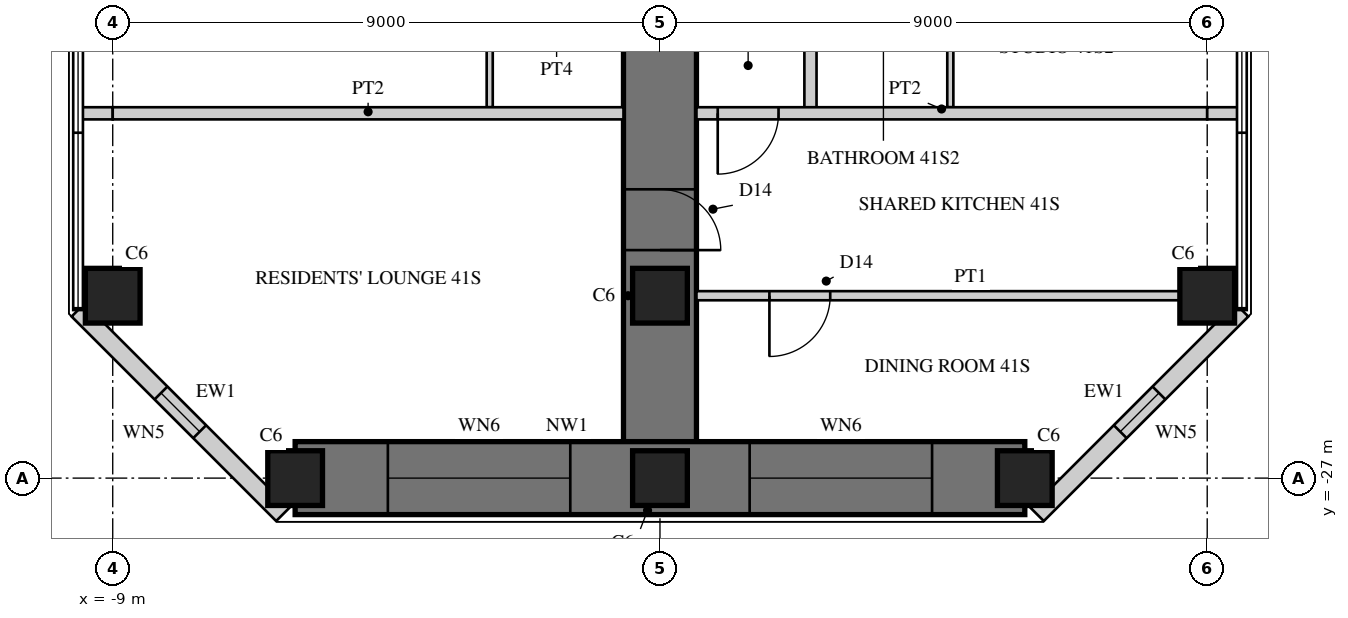
"""IFC4 building model, lengths in metres.
Left out: names, types, materials, properties, quantities, classifications, styles, units other than length and angle.
Written with IfcOpenShell. Run it as: python <this file> out.ifc"""

import sys

from ifc_helpers import new_model, si_unit, direction, frame, frame_2d, origin, origin_2d, place, context, subcontext, project, spatial, rectangle, hollow_rectangle, extrude, element, fill, save


model = new_model("IFC4")
c1 = context("Model", 3, precision=1e-05, world=origin(), true_north=direction((0.0, 1.0)))
c2 = subcontext(c1, "Body", "Model", "MODEL_VIEW")
j1 = project(units=[si_unit("LENGTHUNIT", "METRE"), si_unit("PLANEANGLEUNIT", "RADIAN")], contexts=[c1])
p1 = place(None, origin())
s1 = spatial("IfcSite", under=j1, at=p1, CompositionType="ELEMENT")
p2 = place(p1, origin())
s2 = spatial("IfcBuilding", under=s1, at=p2, CompositionType="ELEMENT")
p3 = place(p2, frame((0.0, 0.0, 169.5)))
s3 = spatial("IfcBuildingStorey", under=s2, at=p3, CompositionType="ELEMENT", Elevation=169.5)
p4 = place(p3, frame((0.0, -9.0, 0.0), z_axis=(0.0, 0.0, 1.0), x_axis=(0.0, -1.0, 0.0)))
e1 = element("IfcWall", 1, at=p4, inside=s3, PredefinedType="SHEAR", context=c2, shape_type="SweptSolid", body=[
    extrude(rectangle(XDim=18.0, YDim=1.2, at=frame_2d((9.0, 0.0))), origin(), (0.0, 0.0, 1.0), 3.4),
])
p5 = place(p4, frame((3.95, 0.0, 0.0)))
e2 = element("IfcOpeningElement", 2, at=p5, cuts=e1, PredefinedType="OPENING", context=c2, shape_type="SweptSolid", body=[
    extrude(rectangle(XDim=1.0, YDim=2.15, at=frame_2d((0.5, 1.075))), frame((0.0, 0.61, 0.0), z_axis=(0.0, -1.0, 0.0), x_axis=(1.0, 0.0, 0.0)), (0.0, 0.0, 1.0), 1.22),
])
p6 = place(p4, frame((6.6, 0.0, 0.0)))
e3 = element("IfcOpeningElement", 3, at=p6, cuts=e1, PredefinedType="OPENING", context=c2, shape_type="SweptSolid", body=[
    extrude(rectangle(XDim=1.0, YDim=2.15, at=frame_2d((0.5, 1.075))), frame((0.0, 0.61, 0.0), z_axis=(0.0, -1.0, 0.0), x_axis=(1.0, 0.0, 0.0)), (0.0, 0.0, 1.0), 1.22),
])
p7 = place(p4, frame((13.25, 0.0, 0.0)))
e4 = element("IfcOpeningElement", 4, at=p7, cuts=e1, PredefinedType="OPENING", context=c2, shape_type="SweptSolid", body=[
    extrude(rectangle(XDim=1.0, YDim=2.2, at=frame_2d((0.5, 1.1))), frame((0.0, 0.61, 0.0), z_axis=(0.0, -1.0, 0.0), x_axis=(1.0, 0.0, 0.0)), (0.0, 0.0, 1.0), 1.22),
])
p8 = place(p3, frame((-6.0, -27.0, 0.0), z_axis=(0.0, 0.0, 1.0), x_axis=(1.0, 0.0, 0.0)))
e5 = element("IfcWall", 5, at=p8, inside=s3, PredefinedType="SHEAR", context=c2, shape_type="SweptSolid", body=[
    extrude(rectangle(XDim=12.0, YDim=1.2, at=frame_2d((6.0, 0.0))), origin(), (0.0, 0.0, 1.0), 3.4),
])
p9 = place(p8, frame((1.525, 0.0, 0.6)))
e6 = element("IfcOpeningElement", 6, at=p9, cuts=e5, PredefinedType="OPENING", context=c2, shape_type="SweptSolid", body=[
    extrude(rectangle(XDim=3.0, YDim=2.4, at=frame_2d((1.5, 1.2))), frame((0.0, 0.61, 0.0), z_axis=(0.0, -1.0, 0.0), x_axis=(1.0, 0.0, 0.0)), (0.0, 0.0, 1.0), 1.22),
])
p10 = place(p8, frame((7.475, 0.0, 0.6)))
e7 = element("IfcOpeningElement", 7, at=p10, cuts=e5, PredefinedType="OPENING", context=c2, shape_type="SweptSolid", body=[
    extrude(rectangle(XDim=3.0, YDim=2.4, at=frame_2d((1.5, 1.2))), frame((0.0, 0.61, 0.0), z_axis=(0.0, -1.0, 0.0), x_axis=(1.0, 0.0, 0.0)), (0.0, 0.0, 1.0), 1.22),
])
for number, where, z_axis, x_axis in (
    (8, (-9.0, -24.0, 0.0), (0.0, 0.0, 1.0), (1.0, 0.0, 0.0)),
    (9, (9.0, -24.0, 0.0), (0.0, 0.0, 1.0), (1.0, 0.0, 0.0)),
    (10, (-6.0, -27.0, 0.0), (0.0, 0.0, 1.0), (1.0, 0.0, 0.0)),
    (11, (0.0, -27.0, 0.0), (0.0, 0.0, 1.0), (1.0, 0.0, 0.0)),
    (12, (6.0, -27.0, 0.0), (0.0, 0.0, 1.0), (1.0, 0.0, 0.0)),
    (13, (0.0, -24.0, 0.0), (0.0, 0.0, 1.0), (1.0, 0.0, 0.0)),
):
    element("IfcColumn", number, at=place(p3, frame(where, z_axis=z_axis, x_axis=x_axis)), inside=s3, PredefinedType="COLUMN", context=c2, shape_type="SweptSolid", body=[
        extrude(rectangle(XDim=0.9, YDim=0.9, at=origin_2d()), origin(), (0.0, 0.0, 1.0), 3.4),
    ])
p11 = place(p3, frame((-9.57, -24.236, 0.0), z_axis=(0.0, 0.0, 1.0), x_axis=(0.707106781187, -0.707106781187, 0.0)))
e14 = element("IfcWall", 14, at=p11, inside=s3, PredefinedType="SOLIDWALL", context=c2, shape_type="SweptSolid", body=[
    extrude(rectangle(XDim=4.757, YDim=0.3, at=frame_2d((2.379, 0.0))), origin(), (0.0, 0.0, 1.0), 3.22),
])
p12 = place(p11, frame((1.929, 0.0, 0.3)))
e15 = element("IfcOpeningElement", 15, at=p12, cuts=e14, PredefinedType="OPENING", context=c2, shape_type="SweptSolid", body=[
    extrude(rectangle(XDim=0.9, YDim=2.4, at=frame_2d((0.45, 1.2))), frame((0.0, 0.16, 0.0), z_axis=(0.0, -1.0, 0.0), x_axis=(1.0, 0.0, 0.0)), (0.0, 0.0, 1.0), 0.32),
])
p13 = place(p3, frame((6.206, -27.6, 0.0), z_axis=(0.0, 0.0, 1.0), x_axis=(0.707106781187, 0.707106781187, 0.0)))
e16 = element("IfcWall", 16, at=p13, inside=s3, PredefinedType="SOLIDWALL", context=c2, shape_type="SweptSolid", body=[
    extrude(rectangle(XDim=4.757, YDim=0.3, at=frame_2d((2.379, 0.0))), origin(), (0.0, 0.0, 1.0), 3.22),
])
p14 = place(p13, frame((1.929, 0.0, 0.3)))
e17 = element("IfcOpeningElement", 17, at=p14, cuts=e16, PredefinedType="OPENING", context=c2, shape_type="SweptSolid", body=[
    extrude(rectangle(XDim=0.9, YDim=2.4, at=frame_2d((0.45, 1.2))), frame((0.0, 0.16, 0.0), z_axis=(0.0, -1.0, 0.0), x_axis=(1.0, 0.0, 0.0)), (0.0, 0.0, 1.0), 0.32),
])
for number, where, z_axis, x_axis in (
    (18, (4.775, -18.45, 0.0), (0.0, 0.0, 1.0), (0.0, -1.0, 0.0)),
    (19, (-2.8, -18.45, 0.0), (0.0, 0.0, 1.0), (0.0, -1.0, 0.0)),
):
    element("IfcWall", number, at=place(p3, frame(where, z_axis=z_axis, x_axis=x_axis)), inside=s3, PredefinedType="PARTITIONING", context=c2, shape_type="SweptSolid", body=[
        extrude(rectangle(XDim=2.45, YDim=0.1, at=frame_2d((1.225, 0.0))), origin(), (0.0, 0.0, 1.0), 3.22),
    ])
p15 = place(p3, frame((2.475, -9.55, 0.0), z_axis=(0.0, 0.0, 1.0), x_axis=(0.0, -1.0, 0.0)))
e20 = element("IfcWall", 20, at=p15, inside=s3, PredefinedType="SOLIDWALL", context=c2, shape_type="SweptSolid", body=[
    extrude(rectangle(XDim=11.45, YDim=0.2, at=frame_2d((5.725, 0.0))), origin(), (0.0, 0.0, 1.0), 3.22),
])
p16 = place(p15, frame((3.6, 0.0, 0.0)))
e21 = element("IfcOpeningElement", 21, at=p16, cuts=e20, PredefinedType="OPENING", context=c2, shape_type="SweptSolid", body=[
    extrude(rectangle(XDim=1.0, YDim=2.15, at=frame_2d((0.5, 1.075))), frame((0.0, 0.11, 0.0), z_axis=(0.0, -1.0, 0.0), x_axis=(1.0, 0.0, 0.0)), (0.0, 0.0, 1.0), 0.22),
])
p17 = place(p15, frame((6.05, 0.0, 0.0)))
e22 = element("IfcOpeningElement", 22, at=p17, cuts=e20, PredefinedType="OPENING", context=c2, shape_type="SweptSolid", body=[
    extrude(rectangle(XDim=1.0, YDim=2.15, at=frame_2d((0.5, 1.075))), frame((0.0, 0.11, 0.0), z_axis=(0.0, -1.0, 0.0), x_axis=(1.0, 0.0, 0.0)), (0.0, 0.0, 1.0), 0.22),
])
p18 = place(p3, frame((0.6, -24.0, 0.0), z_axis=(0.0, 0.0, 1.0), x_axis=(1.0, 0.0, 0.0)))
e23 = element("IfcWall", 23, at=p18, inside=s3, PredefinedType="PARTITIONING", context=c2, shape_type="SweptSolid", body=[
    extrude(rectangle(XDim=7.95, YDim=0.15, at=frame_2d((3.975, 0.0))), origin(), (0.0, 0.0, 1.0), 2.47),
])
p19 = place(p18, frame((1.2, 0.0, 0.0)))
e24 = element("IfcOpeningElement", 24, at=p19, cuts=e23, PredefinedType="OPENING", context=c2, shape_type="SweptSolid", body=[
    extrude(rectangle(XDim=1.0, YDim=2.2, at=frame_2d((0.5, 1.1))), frame((0.0, 0.085, 0.0), z_axis=(0.0, -1.0, 0.0), x_axis=(1.0, 0.0, 0.0)), (0.0, 0.0, 1.0), 0.17),
])
p20 = place(p3, frame((-9.53, -21.0, 0.0), z_axis=(0.0, 0.0, 1.0), x_axis=(1.0, 0.0, 0.0)))
e25 = element("IfcWall", 25, at=p20, inside=s3, PredefinedType="SOLIDWALL", context=c2, shape_type="SweptSolid", body=[
    extrude(rectangle(XDim=0.53, YDim=0.2, at=frame_2d((0.265, 0.0))), origin(), (0.0, 0.0, 1.0), 3.22),
])
p21 = place(p3, frame((-9.0, -21.0, 0.0), z_axis=(0.0, 0.0, 1.0), x_axis=(1.0, 0.0, 0.0)))
e26 = element("IfcWall", 26, at=p21, inside=s3, PredefinedType="SOLIDWALL", context=c2, shape_type="SweptSolid", body=[
    extrude(rectangle(XDim=8.4, YDim=0.2, at=frame_2d((4.2, 0.0))), origin(), (0.0, 0.0, 1.0), 2.62),
])
p22 = place(p3, frame((0.6, -21.0, 0.0), z_axis=(0.0, 0.0, 1.0), x_axis=(1.0, 0.0, 0.0)))
e27 = element("IfcWall", 27, at=p22, inside=s3, PredefinedType="SOLIDWALL", context=c2, shape_type="SweptSolid", body=[
    extrude(rectangle(XDim=8.4, YDim=0.2, at=frame_2d((4.2, 0.0))), origin(), (0.0, 0.0, 1.0), 2.62),
])
p23 = place(p22, frame((0.35, 0.0, 0.0)))
e28 = element("IfcOpeningElement", 28, at=p23, cuts=e27, PredefinedType="OPENING", context=c2, shape_type="SweptSolid", body=[
    extrude(rectangle(XDim=1.0, YDim=2.2, at=frame_2d((0.5, 1.1))), frame((0.0, 0.11, 0.0), z_axis=(0.0, -1.0, 0.0), x_axis=(1.0, 0.0, 0.0)), (0.0, 0.0, 1.0), 0.22),
])
p24 = place(p3, frame((9.0, -21.0, 0.0), z_axis=(0.0, 0.0, 1.0), x_axis=(1.0, 0.0, 0.0)))
e29 = element("IfcWall", 29, at=p24, inside=s3, PredefinedType="SOLIDWALL", context=c2, shape_type="SweptSolid", body=[
    extrude(rectangle(XDim=0.53, YDim=0.2, at=frame_2d((0.265, 0.0))), origin(), (0.0, 0.0, 1.0), 3.22),
])
p25 = place(p12, origin())
e30 = element("IfcWindow", 30, at=p25, inside=s3, PartitioningType="SINGLE_PANEL", PredefinedType="WINDOW", context=c2, shape_type="SweptSolid", body=[
    extrude(hollow_rectangle(XDim=0.9, YDim=2.4, WallThickness=0.06, at=frame_2d((0.45, 1.2))), frame((0.0, 0.03, 0.0), z_axis=(0.0, -1.0, 0.0), x_axis=(1.0, 0.0, 0.0)), (0.0, 0.0, 1.0), 0.06),
    extrude(rectangle(XDim=0.779, YDim=2.279, at=frame_2d((0.45, 1.2))), frame((0.0, 0.03, 0.0), z_axis=(0.0, -1.0, 0.0), x_axis=(1.0, 0.0, 0.0)), (0.0, 0.0, 1.0), 0.06),
])
fill(e15, e30)
p26 = place(p9, origin())
e31 = element("IfcWindow", 31, at=p26, inside=s3, PartitioningType="SINGLE_PANEL", PredefinedType="WINDOW", context=c2, shape_type="SweptSolid", body=[
    extrude(hollow_rectangle(XDim=3.0, YDim=2.4, WallThickness=0.06, at=frame_2d((1.5, 1.2))), frame((0.0, 0.03, 0.0), z_axis=(0.0, -1.0, 0.0), x_axis=(1.0, 0.0, 0.0)), (0.0, 0.0, 1.0), 0.06),
    extrude(rectangle(XDim=2.879, YDim=2.279, at=frame_2d((1.5, 1.2))), frame((0.0, 0.03, 0.0), z_axis=(0.0, -1.0, 0.0), x_axis=(1.0, 0.0, 0.0)), (0.0, 0.0, 1.0), 0.06),
])
fill(e6, e31)
p27 = place(p10, origin())
e32 = element("IfcWindow", 32, at=p27, inside=s3, PartitioningType="SINGLE_PANEL", PredefinedType="WINDOW", context=c2, shape_type="SweptSolid", body=[
    extrude(hollow_rectangle(XDim=3.0, YDim=2.4, WallThickness=0.06, at=frame_2d((1.5, 1.2))), frame((0.0, 0.03, 0.0), z_axis=(0.0, -1.0, 0.0), x_axis=(1.0, 0.0, 0.0)), (0.0, 0.0, 1.0), 0.06),
    extrude(rectangle(XDim=2.879, YDim=2.279, at=frame_2d((1.5, 1.2))), frame((0.0, 0.03, 0.0), z_axis=(0.0, -1.0, 0.0), x_axis=(1.0, 0.0, 0.0)), (0.0, 0.0, 1.0), 0.06),
])
fill(e7, e32)
p28 = place(p14, origin())
e33 = element("IfcWindow", 33, at=p28, inside=s3, PartitioningType="SINGLE_PANEL", PredefinedType="WINDOW", context=c2, shape_type="SweptSolid", body=[
    extrude(hollow_rectangle(XDim=0.9, YDim=2.4, WallThickness=0.06, at=frame_2d((0.45, 1.2))), frame((0.0, 0.03, 0.0), z_axis=(0.0, -1.0, 0.0), x_axis=(1.0, 0.0, 0.0)), (0.0, 0.0, 1.0), 0.06),
    extrude(rectangle(XDim=0.779, YDim=2.279, at=frame_2d((0.45, 1.2))), frame((0.0, 0.03, 0.0), z_axis=(0.0, -1.0, 0.0), x_axis=(1.0, 0.0, 0.0)), (0.0, 0.0, 1.0), 0.06),
])
fill(e17, e33)
p29 = place(p19, frame((1.0, 0.0, 0.0), z_axis=(0.0, 0.0, 1.0), x_axis=(-1.0, 0.0, 0.0)))
e34 = element("IfcDoor", 34, at=p29, inside=s3, OperationType="SINGLE_SWING_RIGHT", PredefinedType="DOOR", context=c2, shape_type="SweptSolid", body=[
    extrude(rectangle(XDim=1.0, YDim=2.2, at=frame_2d((0.5, 1.1))), frame((0.0, 0.025, 0.0), z_axis=(0.0, -1.0, 0.0), x_axis=(1.0, 0.0, 0.0)), (0.0, 0.0, 1.0), 0.05),
])
fill(e24, e34)
p30 = place(p23, frame((1.0, 0.0, 0.0), z_axis=(0.0, 0.0, 1.0), x_axis=(-1.0, 0.0, 0.0)))
e35 = element("IfcDoor", 35, at=p30, inside=s3, OperationType="SINGLE_SWING_RIGHT", PredefinedType="DOOR", context=c2, shape_type="SweptSolid", body=[
    extrude(rectangle(XDim=1.0, YDim=2.2, at=frame_2d((0.5, 1.1))), frame((0.0, 0.025, 0.0), z_axis=(0.0, -1.0, 0.0), x_axis=(1.0, 0.0, 0.0)), (0.0, 0.0, 1.0), 0.05),
])
fill(e28, e35)
p31 = place(p7, origin())
e36 = element("IfcDoor", 36, at=p31, inside=s3, OperationType="SINGLE_SWING_RIGHT", PredefinedType="DOOR", context=c2, shape_type="SweptSolid", body=[
    extrude(rectangle(XDim=1.0, YDim=2.2, at=frame_2d((0.5, 1.1))), frame((0.0, 0.025, 0.0), z_axis=(0.0, -1.0, 0.0), x_axis=(1.0, 0.0, 0.0)), (0.0, 0.0, 1.0), 0.05),
])
fill(e4, e36)
save(model, sys.argv[1])
